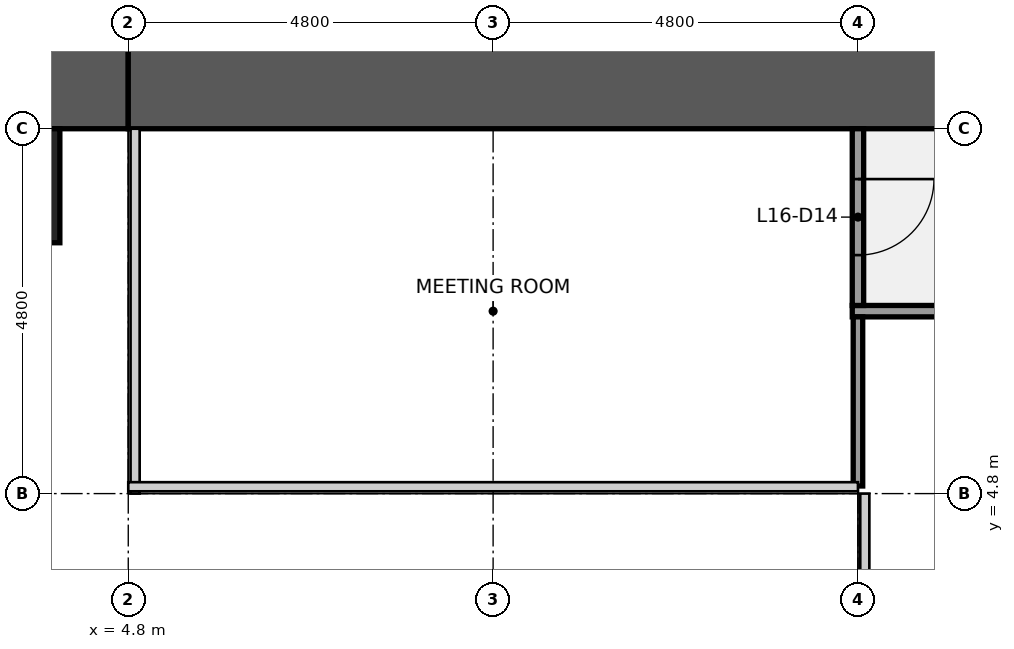
"""IFC4 building model, lengths in metres.
Left out: names, types, materials, properties, quantities, classifications, styles, units other than length and angle.
Written with IfcOpenShell. Run it as: python <this file> out.ifc"""

import sys

from ifc_helpers import new_model, si_unit, direction, frame, frame_2d, origin, origin_2d, place, context, subcontext, project, spatial, rectangle, extrude, element, fill, save


model = new_model("IFC4")
c1 = context("Model", 3, precision=1e-05, world=origin(), true_north=direction((0.0, 1.0)))
c2 = subcontext(c1, "Body", "Model", "MODEL_VIEW")
j1 = project(units=[si_unit("LENGTHUNIT", "METRE"), si_unit("PLANEANGLEUNIT", "RADIAN")], contexts=[c1])
p1 = place(None, origin())
s1 = spatial("IfcSite", under=j1, at=p1, CompositionType="ELEMENT")
p2 = place(p1, origin())
s2 = spatial("IfcBuilding", under=s1, at=p2, CompositionType="ELEMENT")
p3 = place(p2, frame((0.0, 0.0, 75.0)))
s3 = spatial("IfcBuildingStorey", under=s2, at=p3, CompositionType="ELEMENT", Elevation=75.0)
p4 = place(p3, frame((4.8, 10.2, 0.0), z_axis=(0.0, 0.0, 1.0), x_axis=(-1.0, 0.0, 0.0)))
e1 = element("IfcWall", 1, at=p4, inside=s3, PredefinedType="SHEAR", context=c2, shape_type="SweptSolid", body=[
    extrude(rectangle(XDim=3.6, YDim=1.2, at=frame_2d((1.8, 0.0))), origin(), (0.0, 0.0, 1.0), 3.84),
])
p5 = place(p3, frame((18.0, 10.2, 0.0), z_axis=(0.0, 0.0, 1.0), x_axis=(-1.0, 0.0, 0.0)))
e2 = element("IfcWall", 2, at=p5, inside=s3, PredefinedType="SHEAR", context=c2, shape_type="SweptSolid", body=[
    extrude(rectangle(XDim=13.2, YDim=1.2, at=frame_2d((6.6, 0.0))), origin(), (0.0, 0.0, 1.0), 3.84),
])
p6 = place(p5, frame((0.65, 0.0, 0.0)))
e3 = element("IfcOpeningElement", 3, at=p6, cuts=e2, PredefinedType="OPENING", context=c2, shape_type="SweptSolid", body=[
    extrude(rectangle(XDim=1.1, YDim=2.1, at=frame_2d((0.55, 1.05))), frame((0.0, 0.61, 0.0), z_axis=(0.0, -1.0, 0.0), x_axis=(1.0, 0.0, 0.0)), (0.0, 0.0, 1.0), 1.22),
])
p7 = place(p3, frame((14.325, 7.2, 0.0), z_axis=(0.0, 0.0, 1.0), x_axis=(1.0, 0.0, 0.0)))
e4 = element("IfcWall", 4, at=p7, inside=s3, PredefinedType="PARTITIONING", context=c2, shape_type="SweptSolid", body=[
    extrude(rectangle(XDim=4.95, YDim=0.15, at=frame_2d((2.475, 0.0))), origin(), (0.0, 0.0, 1.0), 2.87),
])
p8 = place(p7, frame((1.975, 0.0, 0.0)))
e5 = element("IfcOpeningElement", 5, at=p8, cuts=e4, PredefinedType="OPENING", context=c2, shape_type="SweptSolid", body=[
    extrude(rectangle(XDim=1.0, YDim=2.1, at=frame_2d((0.5, 1.05))), frame((0.0, 0.085, 0.0), z_axis=(0.0, -1.0, 0.0), x_axis=(1.0, 0.0, 0.0)), (0.0, 0.0, 1.0), 0.17),
])
p9 = place(p3, frame((14.4, 4.9, 0.0), z_axis=(0.0, 0.0, 1.0), x_axis=(0.0, 1.0, 0.0)))
e6 = element("IfcWall", 6, at=p9, inside=s3, PredefinedType="PARTITIONING", context=c2, shape_type="SweptSolid", body=[
    extrude(rectangle(XDim=2.225, YDim=0.125, at=frame_2d((1.113, 0.0))), origin(), (0.0, 0.0, 1.0), 2.87),
])
p10 = place(p3, frame((14.4, 7.275, 0.0), z_axis=(0.0, 0.0, 1.0), x_axis=(0.0, 1.0, 0.0)))
e7 = element("IfcWall", 7, at=p10, inside=s3, PredefinedType="PARTITIONING", context=c2, shape_type="SweptSolid", body=[
    extrude(rectangle(XDim=2.325, YDim=0.15, at=frame_2d((1.163, 0.0))), origin(), (0.0, 0.0, 1.0), 2.87),
])
p11 = place(p10, frame((0.663, 0.0, 0.0)))
e8 = element("IfcOpeningElement", 8, at=p11, cuts=e7, PredefinedType="OPENING", context=c2, shape_type="SweptSolid", body=[
    extrude(rectangle(XDim=1.0, YDim=2.1, at=frame_2d((0.5, 1.05))), frame((0.0, 0.085, 0.0), z_axis=(0.0, -1.0, 0.0), x_axis=(1.0, 0.0, 0.0)), (0.0, 0.0, 1.0), 0.17),
])
p12 = place(p3, frame((2.4, 8.85, 0.0), z_axis=(0.0, 0.0, 1.0), x_axis=(1.0, 0.0, 0.0)))
e9 = element("IfcColumn", 9, at=p12, inside=s3, PredefinedType="PILASTER", context=c2, shape_type="SweptSolid", body=[
    extrude(rectangle(XDim=3.0, YDim=1.5, at=origin_2d()), origin(), (0.0, 0.0, 1.0), 4.0),
])
p13 = place(p11, origin())
e10 = element("IfcDoor", 10, at=p13, inside=s3, OperationType="SINGLE_SWING_RIGHT", PredefinedType="DOOR", context=c2, shape_type="SweptSolid", body=[
    extrude(rectangle(XDim=1.0, YDim=2.1, at=frame_2d((0.5, 1.05))), frame((0.0, 0.025, 0.0), z_axis=(0.0, -1.0, 0.0), x_axis=(1.0, 0.0, 0.0)), (0.0, 0.0, 1.0), 0.05),
])
fill(e8, e10)
save(model, sys.argv[1])
